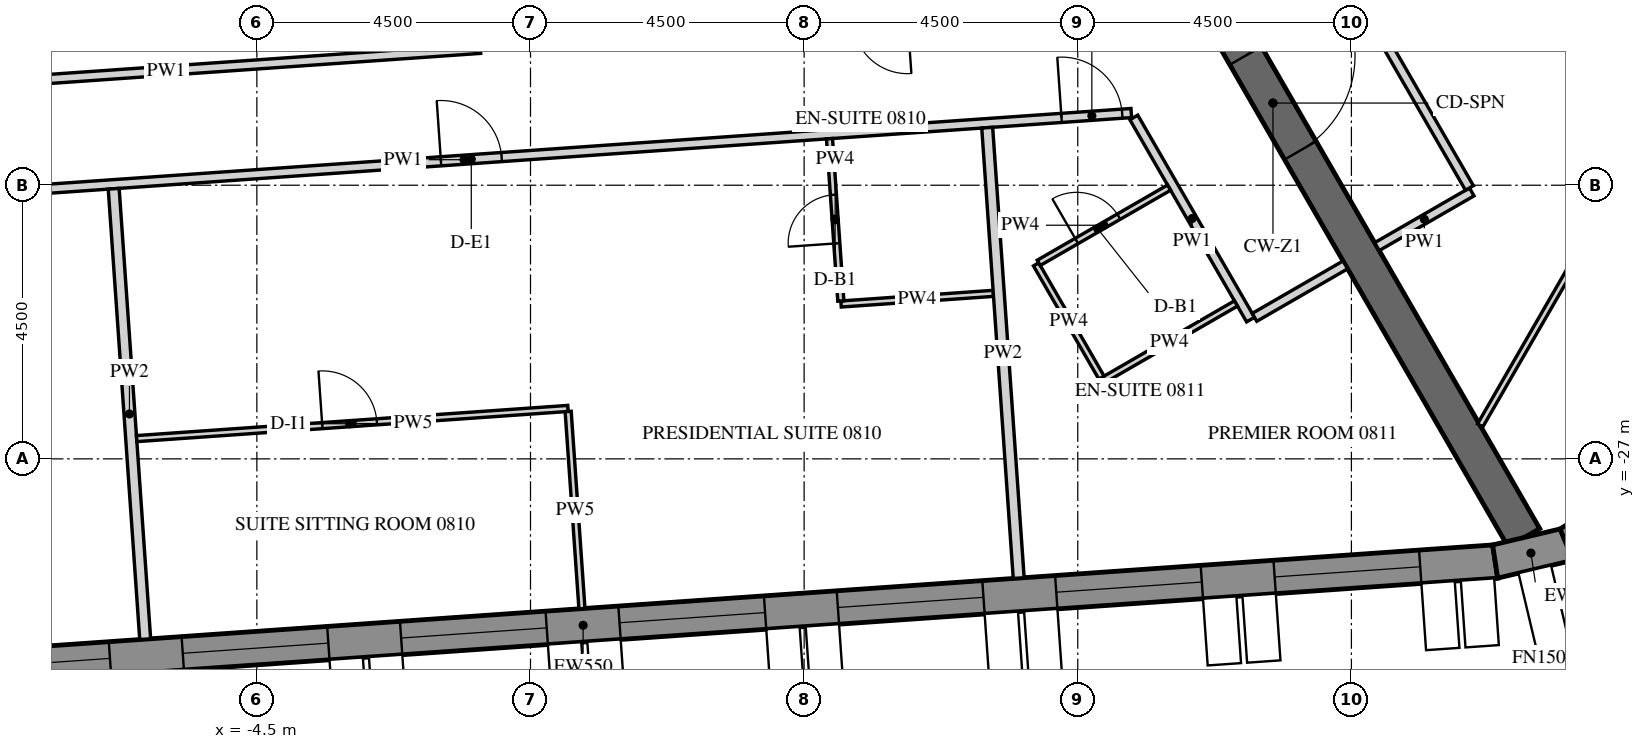
"""IFC4 building model, lengths in metres.
Left out: names, types, materials, properties, quantities, classifications, styles, units other than length and angle.
Written with IfcOpenShell. Run it as: python <this file> out.ifc"""

import sys

from ifc_helpers import new_model, si_unit, direction, frame, frame_2d, origin, place, context, subcontext, project, spatial, polyline, rectangle, outline, extrude, element, fill, save


model = new_model("IFC4")
c1 = context("Model", 3, precision=1e-05, world=origin(), true_north=direction((0.0, 1.0)))
c2 = subcontext(c1, "Body", "Model", "MODEL_VIEW")
j1 = project(units=[si_unit("LENGTHUNIT", "METRE"), si_unit("PLANEANGLEUNIT", "RADIAN")], contexts=[c1])
p1 = place(None, origin())
s1 = spatial("IfcSite", under=j1, at=p1, CompositionType="ELEMENT")
p2 = place(p1, origin())
s2 = spatial("IfcBuilding", under=s1, at=p2, CompositionType="ELEMENT")
p3 = place(p2, frame((0.0, 0.0, 111.6)))
s3 = spatial("IfcBuildingStorey", under=s2, at=p3, CompositionType="ELEMENT", Elevation=111.6)
p4 = place(p3, frame((-14.134, -30.786, -0.15), z_axis=(0.0, 0.0, 1.0), x_axis=(0.997564037441, 0.069756657061, 0.0)))
e1 = element("IfcWall", 1, at=p4, inside=s3, PredefinedType="SOLIDWALL", context=c2, shape_type="SweptSolid", body=[
    extrude(outline(polyline([(-0.026, -0.275), (30.094, -0.275), (30.049, 0.275), (0.026, 0.275), (-0.026, -0.275)])), origin(), (0.0, 0.0, 1.0), 3.9),
])
p5 = place(p4, frame((1.236, 0.0, 1.05)))
e2 = element("IfcOpeningElement", 2, at=p5, cuts=e1, PredefinedType="OPENING", context=c2, shape_type="SweptSolid", body=[
    extrude(rectangle(XDim=2.4, YDim=2.4, at=frame_2d((1.2, 1.2))), frame((0.0, 0.285, 0.0), z_axis=(0.0, -1.0, 0.0), x_axis=(1.0, 0.0, 0.0)), (0.0, 0.0, 1.0), 0.57),
])
p6 = place(p4, frame((4.835, 0.0, 1.05)))
e3 = element("IfcOpeningElement", 3, at=p6, cuts=e1, PredefinedType="OPENING", context=c2, shape_type="SweptSolid", body=[
    extrude(rectangle(XDim=2.4, YDim=2.4, at=frame_2d((1.2, 1.2))), frame((0.0, 0.285, 0.0), z_axis=(0.0, -1.0, 0.0), x_axis=(1.0, 0.0, 0.0)), (0.0, 0.0, 1.0), 0.57),
])
p7 = place(p4, frame((8.436, 0.0, 1.05)))
e4 = element("IfcOpeningElement", 4, at=p7, cuts=e1, PredefinedType="OPENING", context=c2, shape_type="SweptSolid", body=[
    extrude(rectangle(XDim=2.4, YDim=2.4, at=frame_2d((1.2, 1.2))), frame((0.0, 0.285, 0.0), z_axis=(0.0, -1.0, 0.0), x_axis=(1.0, 0.0, 0.0)), (0.0, 0.0, 1.0), 0.57),
])
p8 = place(p4, frame((12.035, 0.0, 1.05)))
e5 = element("IfcOpeningElement", 5, at=p8, cuts=e1, PredefinedType="OPENING", context=c2, shape_type="SweptSolid", body=[
    extrude(rectangle(XDim=2.4, YDim=2.4, at=frame_2d((1.2, 1.2))), frame((0.0, 0.285, 0.0), z_axis=(0.0, -1.0, 0.0), x_axis=(1.0, 0.0, 0.0)), (0.0, 0.0, 1.0), 0.57),
])
p9 = place(p4, frame((15.635, 0.0, 1.05)))
e6 = element("IfcOpeningElement", 6, at=p9, cuts=e1, PredefinedType="OPENING", context=c2, shape_type="SweptSolid", body=[
    extrude(rectangle(XDim=2.4, YDim=2.4, at=frame_2d((1.2, 1.2))), frame((0.0, 0.285, 0.0), z_axis=(0.0, -1.0, 0.0), x_axis=(1.0, 0.0, 0.0)), (0.0, 0.0, 1.0), 0.57),
])
p10 = place(p4, frame((19.236, 0.0, 1.05)))
e7 = element("IfcOpeningElement", 7, at=p10, cuts=e1, PredefinedType="OPENING", context=c2, shape_type="SweptSolid", body=[
    extrude(rectangle(XDim=2.4, YDim=2.4, at=frame_2d((1.2, 1.2))), frame((0.0, 0.285, 0.0), z_axis=(0.0, -1.0, 0.0), x_axis=(1.0, 0.0, 0.0)), (0.0, 0.0, 1.0), 0.57),
])
p11 = place(p4, frame((22.835, 0.0, 1.05)))
e8 = element("IfcOpeningElement", 8, at=p11, cuts=e1, PredefinedType="OPENING", context=c2, shape_type="SweptSolid", body=[
    extrude(rectangle(XDim=2.4, YDim=2.4, at=frame_2d((1.2, 1.2))), frame((0.0, 0.285, 0.0), z_axis=(0.0, -1.0, 0.0), x_axis=(1.0, 0.0, 0.0)), (0.0, 0.0, 1.0), 0.57),
])
p12 = place(p4, frame((26.436, 0.0, 1.05)))
e9 = element("IfcOpeningElement", 9, at=p12, cuts=e1, PredefinedType="OPENING", context=c2, shape_type="SweptSolid", body=[
    extrude(rectangle(XDim=2.4, YDim=2.4, at=frame_2d((1.2, 1.2))), frame((0.0, 0.285, 0.0), z_axis=(0.0, -1.0, 0.0), x_axis=(1.0, 0.0, 0.0)), (0.0, 0.0, 1.0), 0.57),
])
p13 = place(p3, frame((15.864, -28.688, -0.15), z_axis=(0.0, 0.0, 1.0), x_axis=(0.973063591128, 0.230536868247, 0.0)))
e10 = element("IfcWall", 10, at=p13, inside=s3, PredefinedType="SOLIDWALL", context=c2, shape_type="SweptSolid", body=[
    extrude(outline(polyline([(-0.022, -0.275), (1.253, -0.275), (1.163, 0.275), (0.022, 0.275), (-0.022, -0.275)])), origin(), (0.0, 0.0, 1.0), 3.9),
])
p14 = place(p3, frame((17.04, -28.41, -0.15), z_axis=(0.0, 0.0, 1.0), x_axis=(0.847952888306, 0.530071598195, 0.0)))
e11 = element("IfcWall", 11, at=p14, inside=s3, PredefinedType="SOLIDWALL", context=c2, shape_type="SweptSolid", body=[
    extrude(outline(polyline([(-0.045, -0.275), (1.253, -0.275), (1.163, 0.275), (0.045, 0.275), (-0.045, -0.275)])), origin(), (0.0, 0.0, 1.0), 3.9),
])
p15 = place(p3, frame((8.083, -14.0, -0.15), z_axis=(0.0, 0.0, 1.0), x_axis=(0.499997680643, -0.866026742862, 0.0)))
e12 = element("IfcWall", 12, at=p15, inside=s3, PredefinedType="SHEAR", context=c2, shape_type="SweptSolid", body=[
    extrude(rectangle(XDim=16.509, YDim=0.6, at=frame_2d((8.254, 0.0))), origin(), (0.0, 0.0, 1.0), 3.9),
])
p16 = place(p15, frame((7.354, 0.0, 0.15)))
e13 = element("IfcOpeningElement", 13, at=p16, cuts=e12, PredefinedType="OPENING", context=c2, shape_type="SweptSolid", body=[
    extrude(rectangle(XDim=1.8, YDim=2.4, at=frame_2d((0.9, 1.2))), frame((0.0, 0.31, 0.0), z_axis=(0.0, -1.0, 0.0), x_axis=(1.0, 0.0, 0.0)), (0.0, 0.0, 1.0), 0.62),
])
p17 = place(p3, frame((-12.068, -22.847, 0.0), z_axis=(0.0, 0.0, 1.0), x_axis=(0.99756437486, 0.069751831595, 0.0)))
e14 = element("IfcWall", 14, at=p17, inside=s3, PredefinedType="PARTITIONING", context=c2, shape_type="SweptSolid", body=[
    extrude(rectangle(XDim=22.002, YDim=0.15, at=frame_2d((11.001, 0.0))), origin(), (0.0, 0.0, 1.0), 2.988),
])
p18 = place(p17, frame((10.621, 0.0, 0.0)))
e15 = element("IfcOpeningElement", 15, at=p18, cuts=e14, PredefinedType="OPENING", context=c2, shape_type="SweptSolid", body=[
    extrude(rectangle(XDim=1.0, YDim=2.1, at=frame_2d((0.5, 1.05))), frame((0.0, 0.085, 0.0), z_axis=(0.0, -1.0, 0.0), x_axis=(1.0, 0.0, 0.0)), (0.0, 0.0, 1.0), 0.17),
])
p19 = place(p17, frame((20.852, 0.0, 0.0)))
e16 = element("IfcOpeningElement", 16, at=p19, cuts=e14, PredefinedType="OPENING", context=c2, shape_type="SweptSolid", body=[
    extrude(rectangle(XDim=1.0, YDim=2.1, at=frame_2d((0.5, 1.05))), frame((0.0, 0.085, 0.0), z_axis=(0.0, -1.0, 0.0), x_axis=(1.0, 0.0, 0.0)), (0.0, 0.0, 1.0), 0.17),
])
p20 = place(p3, frame((9.922, -21.385, 0.0), z_axis=(0.0, 0.0, 1.0), x_axis=(0.500023335103, -0.866011930837, 0.0)))
e17 = element("IfcWall", 17, at=p20, inside=s3, PredefinedType="PARTITIONING", context=c2, shape_type="SweptSolid", body=[
    extrude(rectangle(XDim=3.84, YDim=0.15, at=frame_2d((1.92, 0.0))), origin(), (0.0, 0.0, 1.0), 2.988),
])
p21 = place(p3, frame((11.906, -24.673, 0.0), z_axis=(0.0, 0.0, 1.0), x_axis=(0.866013532718, 0.500020560727, 0.0)))
e18 = element("IfcWall", 18, at=p21, inside=s3, PredefinedType="PARTITIONING", context=c2, shape_type="SweptSolid", body=[
    extrude(rectangle(XDim=1.725, YDim=0.15, at=frame_2d((0.863, 0.0))), origin(), (0.0, 0.0, 1.0), 2.988),
])
p22 = place(p3, frame((-0.825, -20.257, 0.0), z_axis=(0.0, 0.0, 1.0), x_axis=(-0.9975635143, -0.069764137903, 0.0)))
e19 = element("IfcWall", 19, at=p22, inside=s3, PredefinedType="PARTITIONING", context=c2, shape_type="SweptSolid", body=[
    extrude(rectangle(XDim=10.355, YDim=0.15, at=frame_2d((5.177, 0.0))), origin(), (0.0, 0.0, 1.0), 2.988),
])
p23 = place(p3, frame((13.92, -23.51, 0.0), z_axis=(0.0, 0.0, 1.0), x_axis=(0.866047807691, 0.499961193289, 0.0)))
e20 = element("IfcWall", 20, at=p23, inside=s3, PredefinedType="PARTITIONING", context=c2, shape_type="SweptSolid", body=[
    extrude(rectangle(XDim=1.8, YDim=0.15, at=frame_2d((0.9, 0.0))), origin(), (0.0, 0.0, 1.0), 2.988),
])
p24 = place(p3, frame((15.441, -22.545, 0.0), z_axis=(0.0, 0.0, 1.0), x_axis=(-0.500037089193, 0.86600398927, 0.0)))
e21 = element("IfcWall", 21, at=p24, inside=s3, PredefinedType="PARTITIONING", context=c2, shape_type="SweptSolid", body=[
    extrude(rectangle(XDim=3.112, YDim=0.15, at=frame_2d((1.556, 0.0))), origin(), (0.0, 0.0, 1.0), 2.988),
])
p25 = place(p3, frame((-6.336, -29.965, 0.0), z_axis=(0.0, 0.0, 1.0), x_axis=(-0.06977252161, 0.997562927954, 0.0)))
e22 = element("IfcWall", 22, at=p25, inside=s3, PredefinedType="PARTITIONING", context=c2, shape_type="SweptSolid", body=[
    extrude(rectangle(XDim=7.425, YDim=0.18, at=frame_2d((3.712, 0.0))), origin(), (0.0, 0.0, 1.0), 2.988),
])
p26 = place(p3, frame((7.611, -24.278, 0.0), z_axis=(0.0, 0.0, 1.0), x_axis=(-0.997565196586, -0.069740078583, 0.0)))
e23 = element("IfcWall", 23, at=p26, inside=s3, PredefinedType="PARTITIONING", context=c2, shape_type="SweptSolid", body=[
    extrude(rectangle(XDim=2.51, YDim=0.1, at=frame_2d((1.255, 0.0))), origin(), (0.0, 0.0, 1.0), 2.988),
])
p27 = place(p3, frame((5.104, -24.403, 0.0), z_axis=(0.0, 0.0, 1.0), x_axis=(-0.069729221413, 0.997565955554, 0.0)))
e24 = element("IfcWall", 24, at=p27, inside=s3, PredefinedType="PARTITIONING", context=c2, shape_type="SweptSolid", body=[
    extrude(rectangle(XDim=2.675, YDim=0.1, at=frame_2d((1.337, 0.0))), origin(), (0.0, 0.0, 1.0), 2.988),
])
p28 = place(p27, frame((0.95, 0.0, 0.0)))
e25 = element("IfcOpeningElement", 25, at=p28, cuts=e24, PredefinedType="OPENING", context=c2, shape_type="SweptSolid", body=[
    extrude(rectangle(XDim=0.8, YDim=2.1, at=frame_2d((0.4, 1.05))), frame((0.0, 0.06, 0.0), z_axis=(0.0, -1.0, 0.0), x_axis=(1.0, 0.0, 0.0)), (0.0, 0.0, 1.0), 0.12),
])
p29 = place(p3, frame((-6.477, -26.667, 0.0), z_axis=(0.0, 0.0, 1.0), x_axis=(0.997565277642, 0.069738919141, 0.0)))
e26 = element("IfcWall", 26, at=p29, inside=s3, PredefinedType="PARTITIONING", context=c2, shape_type="SweptSolid", body=[
    extrude(rectangle(XDim=7.11, YDim=0.1, at=frame_2d((3.555, 0.0))), origin(), (0.0, 0.0, 1.0), 2.988),
])
p30 = place(p29, frame((3.06, 0.0, 0.0)))
e27 = element("IfcOpeningElement", 27, at=p30, cuts=e26, PredefinedType="OPENING", context=c2, shape_type="SweptSolid", body=[
    extrude(rectangle(XDim=0.9, YDim=2.1, at=frame_2d((0.45, 1.05))), frame((0.0, 0.06, 0.0), z_axis=(0.0, -1.0, 0.0), x_axis=(1.0, 0.0, 0.0)), (0.0, 0.0, 1.0), 0.12),
])
p31 = place(p3, frame((0.619, -26.221, 0.0), z_axis=(0.0, 0.0, 1.0), x_axis=(0.069789506462, -0.997561739838, 0.0)))
e28 = element("IfcWall", 28, at=p31, inside=s3, PredefinedType="PARTITIONING", context=c2, shape_type="SweptSolid", body=[
    extrude(rectangle(XDim=3.25, YDim=0.1, at=frame_2d((1.625, 0.0))), origin(), (0.0, 0.0, 1.0), 2.988),
])
p32 = place(p3, frame((8.029, -28.96, 0.0), z_axis=(0.0, 0.0, 1.0), x_axis=(-0.069739801019, 0.99756521599, 0.0)))
e29 = element("IfcWall", 29, at=p32, inside=s3, PredefinedType="PARTITIONING", context=c2, shape_type="SweptSolid", body=[
    extrude(rectangle(XDim=7.425, YDim=0.18, at=frame_2d((3.712, 0.0))), origin(), (0.0, 0.0, 1.0), 2.988),
])
p33 = place(p3, frame((11.602, -24.445, 0.0), z_axis=(0.0, 0.0, 1.0), x_axis=(-0.866039067339, -0.499976333282, 0.0)))
e30 = element("IfcWall", 30, at=p33, inside=s3, PredefinedType="PARTITIONING", context=c2, shape_type="SweptSolid", body=[
    extrude(rectangle(XDim=2.525, YDim=0.1, at=frame_2d((1.262, 0.0))), origin(), (0.0, 0.0, 1.0), 2.988),
])
p34 = place(p3, frame((9.39, -25.664, 0.0), z_axis=(0.0, 0.0, 1.0), x_axis=(-0.500010803666, 0.866019166195, 0.0)))
e31 = element("IfcWall", 31, at=p34, inside=s3, PredefinedType="PARTITIONING", context=c2, shape_type="SweptSolid", body=[
    extrude(rectangle(XDim=2.15, YDim=0.1, at=frame_2d((1.075, 0.0))), origin(), (0.0, 0.0, 1.0), 2.988),
])
p35 = place(p3, frame((8.358, -23.777, 0.0), z_axis=(0.0, 0.0, 1.0), x_axis=(0.86604923931, 0.499958713387, 0.0)))
e32 = element("IfcWall", 32, at=p35, inside=s3, PredefinedType="PARTITIONING", context=c2, shape_type="SweptSolid", body=[
    extrude(rectangle(XDim=2.475, YDim=0.1, at=frame_2d((1.237, 0.0))), origin(), (0.0, 0.0, 1.0), 2.988),
])
p36 = place(p35, frame((0.72, 0.0, 0.0)))
e33 = element("IfcOpeningElement", 33, at=p36, cuts=e32, PredefinedType="OPENING", context=c2, shape_type="SweptSolid", body=[
    extrude(rectangle(XDim=0.8, YDim=2.1, at=frame_2d((0.4, 1.05))), frame((0.0, 0.06, 0.0), z_axis=(0.0, -1.0, 0.0), x_axis=(1.0, 0.0, 0.0)), (0.0, 0.0, 1.0), 0.12),
])
p37 = place(p3, frame((15.617, -26.45, 0.0), z_axis=(0.0, 0.0, 1.0), x_axis=(0.499984630745, 0.866034277046, 0.0)))
e34 = element("IfcWall", 34, at=p37, inside=s3, PredefinedType="PARTITIONING", context=c2, shape_type="SweptSolid", body=[
    extrude(rectangle(XDim=9.109, YDim=0.1, at=frame_2d((4.554, 0.0))), origin(), (0.0, 0.0, 1.0), 2.988),
])
p38 = place(p37, frame((5.059, 0.0, 0.0)))
e35 = element("IfcOpeningElement", 35, at=p38, cuts=e34, PredefinedType="OPENING", context=c2, shape_type="SweptSolid", body=[
    extrude(rectangle(XDim=0.9, YDim=2.1, at=frame_2d((0.45, 1.05))), frame((0.0, 0.06, 0.0), z_axis=(0.0, -1.0, 0.0), x_axis=(1.0, 0.0, 0.0)), (0.0, 0.0, 1.0), 0.12),
])
p39 = place(p6, frame((0.0, 0.205, 0.0)))
e36 = element("IfcWindow", 36, at=p39, inside=s3, PartitioningType="DOUBLE_PANEL_VERTICAL", PredefinedType="WINDOW", context=c2, shape_type="SweptSolid", body=[
    extrude(rectangle(XDim=2.4, YDim=2.4, at=frame_2d((1.2, 1.2))), frame((0.0, 0.03, 0.0), z_axis=(0.0, -1.0, 0.0), x_axis=(1.0, 0.0, 0.0)), (0.0, 0.0, 1.0), 0.06),
])
fill(e3, e36)
p40 = place(p7, frame((0.0, 0.205, 0.0)))
e37 = element("IfcWindow", 37, at=p40, inside=s3, PartitioningType="DOUBLE_PANEL_VERTICAL", PredefinedType="WINDOW", context=c2, shape_type="SweptSolid", body=[
    extrude(rectangle(XDim=2.4, YDim=2.4, at=frame_2d((1.2, 1.2))), frame((0.0, 0.03, 0.0), z_axis=(0.0, -1.0, 0.0), x_axis=(1.0, 0.0, 0.0)), (0.0, 0.0, 1.0), 0.06),
])
fill(e4, e37)
p41 = place(p8, frame((0.0, 0.205, 0.0)))
e38 = element("IfcWindow", 38, at=p41, inside=s3, PartitioningType="DOUBLE_PANEL_VERTICAL", PredefinedType="WINDOW", context=c2, shape_type="SweptSolid", body=[
    extrude(rectangle(XDim=2.4, YDim=2.4, at=frame_2d((1.2, 1.2))), frame((0.0, 0.03, 0.0), z_axis=(0.0, -1.0, 0.0), x_axis=(1.0, 0.0, 0.0)), (0.0, 0.0, 1.0), 0.06),
])
fill(e5, e38)
p42 = place(p9, frame((0.0, 0.205, 0.0)))
e39 = element("IfcWindow", 39, at=p42, inside=s3, PartitioningType="DOUBLE_PANEL_VERTICAL", PredefinedType="WINDOW", context=c2, shape_type="SweptSolid", body=[
    extrude(rectangle(XDim=2.4, YDim=2.4, at=frame_2d((1.2, 1.2))), frame((0.0, 0.03, 0.0), z_axis=(0.0, -1.0, 0.0), x_axis=(1.0, 0.0, 0.0)), (0.0, 0.0, 1.0), 0.06),
])
fill(e6, e39)
p43 = place(p10, frame((0.0, 0.205, 0.0)))
e40 = element("IfcWindow", 40, at=p43, inside=s3, PartitioningType="DOUBLE_PANEL_VERTICAL", PredefinedType="WINDOW", context=c2, shape_type="SweptSolid", body=[
    extrude(rectangle(XDim=2.4, YDim=2.4, at=frame_2d((1.2, 1.2))), frame((0.0, 0.03, 0.0), z_axis=(0.0, -1.0, 0.0), x_axis=(1.0, 0.0, 0.0)), (0.0, 0.0, 1.0), 0.06),
])
fill(e7, e40)
p44 = place(p11, frame((0.0, 0.205, 0.0)))
e41 = element("IfcWindow", 41, at=p44, inside=s3, PartitioningType="DOUBLE_PANEL_VERTICAL", PredefinedType="WINDOW", context=c2, shape_type="SweptSolid", body=[
    extrude(rectangle(XDim=2.4, YDim=2.4, at=frame_2d((1.2, 1.2))), frame((0.0, 0.03, 0.0), z_axis=(0.0, -1.0, 0.0), x_axis=(1.0, 0.0, 0.0)), (0.0, 0.0, 1.0), 0.06),
])
fill(e8, e41)
p45 = place(p12, frame((0.0, 0.205, 0.0)))
e42 = element("IfcWindow", 42, at=p45, inside=s3, PartitioningType="DOUBLE_PANEL_VERTICAL", PredefinedType="WINDOW", context=c2, shape_type="SweptSolid", body=[
    extrude(rectangle(XDim=2.4, YDim=2.4, at=frame_2d((1.2, 1.2))), frame((0.0, 0.03, 0.0), z_axis=(0.0, -1.0, 0.0), x_axis=(1.0, 0.0, 0.0)), (0.0, 0.0, 1.0), 0.06),
])
fill(e9, e42)
p46 = place(p16, origin())
e43 = element("IfcDoor", 43, at=p46, inside=s3, OperationType="DOUBLE_DOOR_SINGLE_SWING", PredefinedType="DOOR", context=c2, shape_type="SweptSolid", body=[
    extrude(rectangle(XDim=1.8, YDim=2.4, at=frame_2d((0.9, 1.2))), frame((0.0, 0.025, 0.0), z_axis=(0.0, -1.0, 0.0), x_axis=(1.0, 0.0, 0.0)), (0.0, 0.0, 1.0), 0.05),
])
fill(e13, e43)
p47 = place(p18, origin())
e44 = element("IfcDoor", 44, at=p47, inside=s3, OperationType="SINGLE_SWING_RIGHT", PredefinedType="DOOR", context=c2, shape_type="SweptSolid", body=[
    extrude(rectangle(XDim=1.0, YDim=2.1, at=frame_2d((0.5, 1.05))), frame((0.0, 0.025, 0.0), z_axis=(0.0, -1.0, 0.0), x_axis=(1.0, 0.0, 0.0)), (0.0, 0.0, 1.0), 0.05),
])
fill(e15, e44)
p48 = place(p28, origin())
e45 = element("IfcDoor", 45, at=p48, inside=s3, OperationType="SINGLE_SWING_RIGHT", PredefinedType="DOOR", context=c2, shape_type="SweptSolid", body=[
    extrude(rectangle(XDim=0.8, YDim=2.1, at=frame_2d((0.4, 1.05))), frame((0.0, 0.025, 0.0), z_axis=(0.0, -1.0, 0.0), x_axis=(1.0, 0.0, 0.0)), (0.0, 0.0, 1.0), 0.05),
])
fill(e25, e45)
p49 = place(p30, origin())
e46 = element("IfcDoor", 46, at=p49, inside=s3, OperationType="SINGLE_SWING_RIGHT", PredefinedType="DOOR", context=c2, shape_type="SweptSolid", body=[
    extrude(rectangle(XDim=0.9, YDim=2.1, at=frame_2d((0.45, 1.05))), frame((0.0, 0.025, 0.0), z_axis=(0.0, -1.0, 0.0), x_axis=(1.0, 0.0, 0.0)), (0.0, 0.0, 1.0), 0.05),
])
fill(e27, e46)
p50 = place(p19, origin())
e47 = element("IfcDoor", 47, at=p50, inside=s3, OperationType="SINGLE_SWING_LEFT", PredefinedType="DOOR", context=c2, shape_type="SweptSolid", body=[
    extrude(rectangle(XDim=1.0, YDim=2.1, at=frame_2d((0.5, 1.05))), frame((0.0, 0.025, 0.0), z_axis=(0.0, -1.0, 0.0), x_axis=(1.0, 0.0, 0.0)), (0.0, 0.0, 1.0), 0.05),
])
fill(e16, e47)
p51 = place(p36, origin())
e48 = element("IfcDoor", 48, at=p51, inside=s3, OperationType="SINGLE_SWING_RIGHT", PredefinedType="DOOR", context=c2, shape_type="SweptSolid", body=[
    extrude(rectangle(XDim=0.8, YDim=2.1, at=frame_2d((0.4, 1.05))), frame((0.0, 0.025, 0.0), z_axis=(0.0, -1.0, 0.0), x_axis=(1.0, 0.0, 0.0)), (0.0, 0.0, 1.0), 0.05),
])
fill(e33, e48)
save(model, sys.argv[1])
